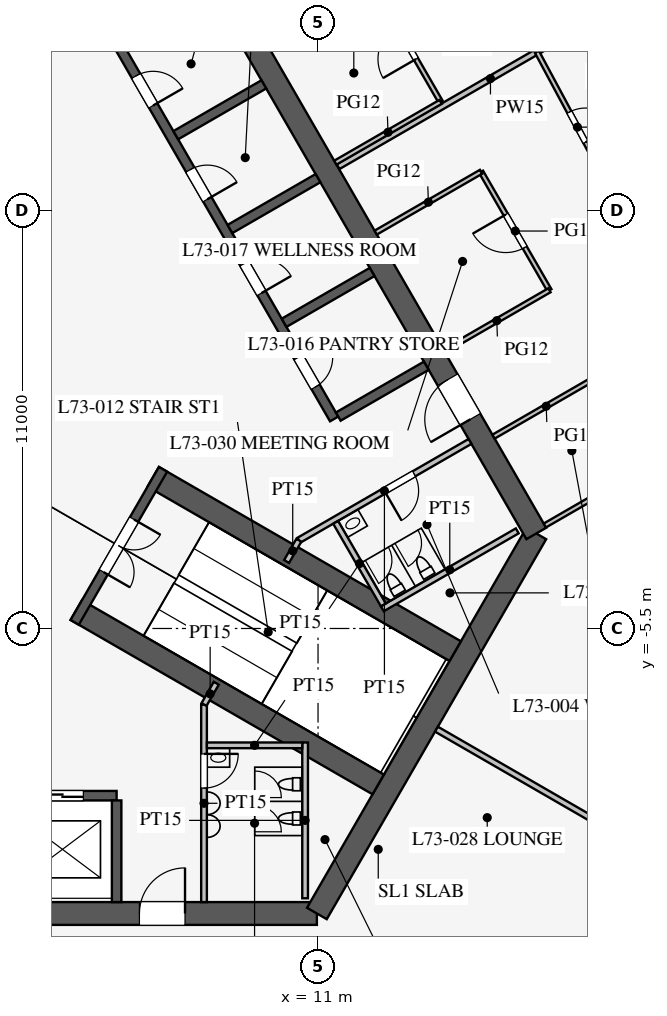
"""IFC4 building model, lengths in metres.
Left out: names, types, materials, properties, quantities, classifications, styles, units other than length and angle.
Written with IfcOpenShell. Run it as: python <this file> out.ifc"""

import sys

from ifc_helpers import new_model, si_unit, direction, frame, frame_2d, origin, place, context, subcontext, project, spatial, rectangle, extrude, element, fill, save


model = new_model("IFC4")
c1 = context("Model", 3, precision=1e-05, world=origin(), true_north=direction((0.0, 1.0)))
c2 = subcontext(c1, "Body", "Model", "MODEL_VIEW")
j1 = project(units=[si_unit("LENGTHUNIT", "METRE"), si_unit("PLANEANGLEUNIT", "RADIAN")], contexts=[c1])
p1 = place(None, origin())
s1 = spatial("IfcSite", under=j1, at=p1, CompositionType="ELEMENT")
p2 = place(p1, origin())
s2 = spatial("IfcBuilding", under=s1, at=p2, CompositionType="ELEMENT")
p3 = place(p2, frame((0.0, 0.0, 318.3)))
s3 = spatial("IfcBuildingStorey", under=s2, at=p3, CompositionType="ELEMENT", Elevation=318.3)
p4 = place(p3, frame((-10.97, -13.0, 0.0), z_axis=(0.0, 0.0, 1.0), x_axis=(1.0, 0.0, 0.0)))
e1 = element("IfcWall", 1, at=p4, inside=s3, PredefinedType="SHEAR", context=c2, shape_type="SweptSolid", body=[
    extrude(rectangle(XDim=21.939, YDim=0.6, at=frame_2d((10.97, 0.0))), origin(), (0.0, 0.0, 1.0), 4.2),
])
p5 = place(p4, frame((17.27, 0.0, 0.0)))
e2 = element("IfcOpeningElement", 2, at=p5, cuts=e1, PredefinedType="OPENING", context=c2, shape_type="SweptSolid", body=[
    extrude(rectangle(XDim=1.2, YDim=2.1, at=frame_2d((0.6, 1.05))), frame((0.0, 0.31, 0.0), z_axis=(0.0, -1.0, 0.0), x_axis=(1.0, 0.0, 0.0)), (0.0, 0.0, 1.0), 0.62),
])
p6 = place(p4, frame((3.47, 0.0, 0.0)))
e3 = element("IfcOpeningElement", 3, at=p6, cuts=e1, PredefinedType="OPENING", context=c2, shape_type="SweptSolid", body=[
    extrude(rectangle(XDim=1.2, YDim=2.1, at=frame_2d((0.6, 1.05))), frame((0.0, 0.31, 0.0), z_axis=(0.0, -1.0, 0.0), x_axis=(1.0, 0.0, 0.0)), (0.0, 0.0, 1.0), 0.62),
])
p7 = place(p3, frame((10.97, -13.0, 0.0), z_axis=(0.0, 0.0, 1.0), x_axis=(0.499995765644, 0.866027848477, 0.0)))
e4 = element("IfcWall", 4, at=p7, inside=s3, PredefinedType="SHEAR", context=c2, shape_type="SweptSolid", body=[
    extrude(rectangle(XDim=11.547, YDim=0.6, at=frame_2d((5.773, 0.0))), origin(), (0.0, 0.0, 1.0), 4.2),
])
p8 = place(p3, frame((16.743, -3.0, 0.0), z_axis=(0.0, 0.0, 1.0), x_axis=(-0.500002442456, 0.866023993627, 0.0)))
e5 = element("IfcWall", 5, at=p8, inside=s3, PredefinedType="SHEAR", context=c2, shape_type="SweptSolid", body=[
    extrude(rectangle(XDim=21.939, YDim=0.6, at=frame_2d((10.97, 0.0))), origin(), (0.0, 0.0, 1.0), 4.2),
])
p9 = place(p8, frame((17.27, 0.0, 0.0)))
e6 = element("IfcOpeningElement", 6, at=p9, cuts=e5, PredefinedType="OPENING", context=c2, shape_type="SweptSolid", body=[
    extrude(rectangle(XDim=1.2, YDim=2.1, at=frame_2d((0.6, 1.05))), frame((0.0, 0.31, 0.0), z_axis=(0.0, -1.0, 0.0), x_axis=(1.0, 0.0, 0.0)), (0.0, 0.0, 1.0), 0.62),
])
p10 = place(p8, frame((3.47, 0.0, 0.0)))
e7 = element("IfcOpeningElement", 7, at=p10, cuts=e5, PredefinedType="OPENING", context=c2, shape_type="SweptSolid", body=[
    extrude(rectangle(XDim=1.2, YDim=2.1, at=frame_2d((0.6, 1.05))), frame((0.0, 0.31, 0.0), z_axis=(0.0, -1.0, 0.0), x_axis=(1.0, 0.0, 0.0)), (0.0, 0.0, 1.0), 0.62),
])
p11 = place(p3, frame((-5.7, -9.9, 0.0), z_axis=(0.0, 0.0, 1.0), x_axis=(1.0, 0.0, 0.0)))
e8 = element("IfcWall", 8, at=p11, inside=s3, PredefinedType="SHEAR", context=c2, shape_type="SweptSolid", body=[
    extrude(rectangle(XDim=11.4, YDim=0.25, at=frame_2d((5.7, 0.0))), origin(), (0.0, 0.0, 1.0), 4.2),
])
p12 = place(p11, frame((0.875, 0.0, 0.0)))
e9 = element("IfcOpeningElement", 9, at=p12, cuts=e8, PredefinedType="OPENING", context=c2, shape_type="SweptSolid", body=[
    extrude(rectangle(XDim=1.1, YDim=2.2, at=frame_2d((0.55, 1.1))), frame((0.0, 0.135, 0.0), z_axis=(0.0, -1.0, 0.0), x_axis=(1.0, 0.0, 0.0)), (0.0, 0.0, 1.0), 0.27),
])
p13 = place(p11, frame((3.725, 0.0, 0.0)))
e10 = element("IfcOpeningElement", 10, at=p13, cuts=e8, PredefinedType="OPENING", context=c2, shape_type="SweptSolid", body=[
    extrude(rectangle(XDim=1.1, YDim=2.2, at=frame_2d((0.55, 1.1))), frame((0.0, 0.135, 0.0), z_axis=(0.0, -1.0, 0.0), x_axis=(1.0, 0.0, 0.0)), (0.0, 0.0, 1.0), 0.27),
])
p14 = place(p11, frame((6.575, 0.0, 0.0)))
e11 = element("IfcOpeningElement", 11, at=p14, cuts=e8, PredefinedType="OPENING", context=c2, shape_type="SweptSolid", body=[
    extrude(rectangle(XDim=1.1, YDim=2.2, at=frame_2d((0.55, 1.1))), frame((0.0, 0.135, 0.0), z_axis=(0.0, -1.0, 0.0), x_axis=(1.0, 0.0, 0.0)), (0.0, 0.0, 1.0), 0.27),
])
p15 = place(p11, frame((9.425, 0.0, 0.0)))
e12 = element("IfcOpeningElement", 12, at=p15, cuts=e8, PredefinedType="OPENING", context=c2, shape_type="SweptSolid", body=[
    extrude(rectangle(XDim=1.1, YDim=2.2, at=frame_2d((0.55, 1.1))), frame((0.0, 0.135, 0.0), z_axis=(0.0, -1.0, 0.0), x_axis=(1.0, 0.0, 0.0)), (0.0, 0.0, 1.0), 0.27),
])
p16 = place(p3, frame((5.7, -10.025, 0.0), z_axis=(0.0, 0.0, 1.0), x_axis=(0.0, -1.0, 0.0)))
e13 = element("IfcWall", 13, at=p16, inside=s3, PredefinedType="SHEAR", context=c2, shape_type="SweptSolid", body=[
    extrude(rectangle(XDim=2.675, YDim=0.25, at=frame_2d((1.337, 0.0))), origin(), (0.0, 0.0, 1.0), 4.2),
])
p17 = place(p3, frame((11.424, 0.014, 0.0), z_axis=(0.0, 0.0, 1.0), x_axis=(-0.500001763848, 0.866024385424, 0.0)))
e14 = element("IfcWall", 14, at=p17, inside=s3, PredefinedType="SHEAR", context=c2, shape_type="SweptSolid", body=[
    extrude(rectangle(XDim=11.4, YDim=0.25, at=frame_2d((5.7, 0.0))), origin(), (0.0, 0.0, 1.0), 4.2),
])
p18 = place(p17, frame((0.975, 0.0, 0.0)))
e15 = element("IfcOpeningElement", 15, at=p18, cuts=e14, PredefinedType="OPENING", context=c2, shape_type="SweptSolid", body=[
    extrude(rectangle(XDim=0.9, YDim=2.1, at=frame_2d((0.45, 1.05))), frame((0.0, 0.135, 0.0), z_axis=(0.0, -1.0, 0.0), x_axis=(1.0, 0.0, 0.0)), (0.0, 0.0, 1.0), 0.27),
])
p19 = place(p17, frame((3.825, 0.0, 0.0)))
e16 = element("IfcOpeningElement", 16, at=p19, cuts=e14, PredefinedType="OPENING", context=c2, shape_type="SweptSolid", body=[
    extrude(rectangle(XDim=0.9, YDim=2.1, at=frame_2d((0.45, 1.05))), frame((0.0, 0.135, 0.0), z_axis=(0.0, -1.0, 0.0), x_axis=(1.0, 0.0, 0.0)), (0.0, 0.0, 1.0), 0.27),
])
p20 = place(p17, frame((6.675, 0.0, 0.0)))
e17 = element("IfcOpeningElement", 17, at=p20, cuts=e14, PredefinedType="OPENING", context=c2, shape_type="SweptSolid", body=[
    extrude(rectangle(XDim=0.9, YDim=2.1, at=frame_2d((0.45, 1.05))), frame((0.0, 0.135, 0.0), z_axis=(0.0, -1.0, 0.0), x_axis=(1.0, 0.0, 0.0)), (0.0, 0.0, 1.0), 0.27),
])
p21 = place(p17, frame((9.525, 0.0, 0.0)))
e18 = element("IfcOpeningElement", 18, at=p21, cuts=e14, PredefinedType="OPENING", context=c2, shape_type="SweptSolid", body=[
    extrude(rectangle(XDim=0.9, YDim=2.1, at=frame_2d((0.45, 1.05))), frame((0.0, 0.135, 0.0), z_axis=(0.0, -1.0, 0.0), x_axis=(1.0, 0.0, 0.0)), (0.0, 0.0, 1.0), 0.27),
])
for number, where, z_axis, x_axis in (
    (19, (11.532, 0.076, 0.0), (0.0, 0.0, 1.0), (0.866, 0.5, 0.0)),
    (20, (10.107, 2.544, 0.0), (0.0, 0.0, 1.0), (0.866, 0.5, 0.0)),
    (21, (8.682, 5.012, 0.0), (0.0, 0.0, 1.0), (0.866, 0.5, 0.0)),
    (22, (7.257, 7.481, 0.0), (0.0, 0.0, 1.0), (0.866, 0.5, 0.0)),
):
    element("IfcWall", number, at=place(p3, frame(where, z_axis=z_axis, x_axis=x_axis)), inside=s3, PredefinedType="SHEAR", context=c2, shape_type="SweptSolid", body=[
        extrude(rectangle(XDim=2.675, YDim=0.25, at=frame_2d((1.337, 0.0))), origin(), (0.0, 0.0, 1.0), 4.2),
    ])
p22 = place(p3, frame((4.638, -5.016, 0.0), z_axis=(0.0, 0.0, 1.0), x_axis=(0.866012320003, -0.50002266109, 0.0)))
e23 = element("IfcWall", 23, at=p22, inside=s3, PredefinedType="SHEAR", context=c2, shape_type="SweptSolid", body=[
    extrude(rectangle(XDim=9.175, YDim=0.6, at=frame_2d((4.587, 0.0))), origin(), (0.0, 0.0, 1.0), 4.2),
])
p23 = place(p3, frame((6.663, -1.509, 0.0), z_axis=(0.0, 0.0, 1.0), x_axis=(0.86603049496, -0.499991181721, 0.0)))
e24 = element("IfcWall", 24, at=p23, inside=s3, PredefinedType="SHEAR", context=c2, shape_type="SweptSolid", body=[
    extrude(rectangle(XDim=9.175, YDim=0.6, at=frame_2d((4.587, 0.0))), origin(), (0.0, 0.0, 1.0), 4.2),
])
p24 = place(p3, frame((4.597, -5.339, 0.0), z_axis=(0.0, 0.0, 1.0), x_axis=(0.499984536904, 0.866034331223, 0.0)))
e25 = element("IfcWall", 25, at=p24, inside=s3, PredefinedType="SHEAR", context=c2, shape_type="SweptSolid", body=[
    extrude(rectangle(XDim=4.65, YDim=0.25, at=frame_2d((2.325, 0.0))), origin(), (0.0, 0.0, 1.0), 4.2),
])
p25 = place(p24, frame((1.525, 0.0, 0.0)))
e26 = element("IfcOpeningElement", 26, at=p25, cuts=e25, PredefinedType="OPENING", context=c2, shape_type="SweptSolid", body=[
    extrude(rectangle(XDim=1.6, YDim=2.1, at=frame_2d((0.8, 1.05))), frame((0.0, 0.135, 0.0), z_axis=(0.0, -1.0, 0.0), x_axis=(1.0, 0.0, 0.0)), (0.0, 0.0, 1.0), 0.27),
])
p26 = place(p3, frame((8.0, -7.5, 0.0), z_axis=(0.0, 0.0, 1.0), x_axis=(0.0, -1.0, 0.0)))
e27 = element("IfcWall", 27, at=p26, inside=s3, PredefinedType="PARTITIONING", context=c2, shape_type="SweptSolid", body=[
    extrude(rectangle(XDim=5.2, YDim=0.15, at=frame_2d((2.6, 0.0))), origin(), (0.0, 0.0, 1.0), 4.0),
])
p27 = place(p26, frame((1.3, 0.0, 0.0)))
e28 = element("IfcOpeningElement", 28, at=p27, cuts=e27, PredefinedType="OPENING", context=c2, shape_type="SweptSolid", body=[
    extrude(rectangle(XDim=0.9, YDim=2.1, at=frame_2d((0.45, 1.05))), frame((0.0, 0.085, 0.0), z_axis=(0.0, -1.0, 0.0), x_axis=(1.0, 0.0, 0.0)), (0.0, 0.0, 1.0), 0.17),
])
p28 = place(p3, frame((10.495, -3.178, 0.0), z_axis=(0.0, 0.0, 1.0), x_axis=(0.866021400173, 0.500006934395, 0.0)))
e29 = element("IfcWall", 29, at=p28, inside=s3, PredefinedType="PARTITIONING", context=c2, shape_type="SweptSolid", body=[
    extrude(rectangle(XDim=5.2, YDim=0.15, at=frame_2d((2.6, 0.0))), origin(), (0.0, 0.0, 1.0), 4.0),
])
p29 = place(p28, frame((2.6, 0.0, 0.0)))
e30 = element("IfcOpeningElement", 30, at=p29, cuts=e29, PredefinedType="OPENING", context=c2, shape_type="SweptSolid", body=[
    extrude(rectangle(XDim=0.9, YDim=2.1, at=frame_2d((0.45, 1.05))), frame((0.0, 0.085, 0.0), z_axis=(0.0, -1.0, 0.0), x_axis=(1.0, 0.0, 0.0)), (0.0, 0.0, 1.0), 0.17),
])
for number, where, z_axis, x_axis in (
    (31, (8.0, -7.5, 0.0), (0.0, 0.0, 1.0), (0.5, 0.866, 0.0)),
    (32, (10.495, -3.178, 0.0), (0.0, 0.0, 1.0), (-0.5, -0.866, 0.0)),
):
    element("IfcWall", number, at=place(p3, frame(where, z_axis=z_axis, x_axis=x_axis)), inside=s3, PredefinedType="PARTITIONING", context=c2, shape_type="SweptSolid", body=[
        extrude(rectangle(XDim=0.645, YDim=0.15, at=frame_2d((0.323, 0.0))), origin(), (0.0, 0.0, 1.0), 4.0),
    ])
p30 = place(p3, frame((10.66, -8.5, 0.0), z_axis=(0.0, 0.0, 1.0), x_axis=(0.0, -1.0, 0.0)))
e33 = element("IfcWall", 33, at=p30, inside=s3, PredefinedType="PARTITIONING", context=c2, shape_type="SweptSolid", body=[
    extrude(rectangle(XDim=4.1, YDim=0.15, at=frame_2d((2.05, 0.0))), origin(), (0.0, 0.0, 1.0), 4.0),
])
p31 = place(p3, frame((8.075, -8.575, 0.0), z_axis=(0.0, 0.0, 1.0), x_axis=(1.0, 0.0, 0.0)))
e34 = element("IfcWall", 34, at=p31, inside=s3, PredefinedType="PARTITIONING", context=c2, shape_type="SweptSolid", body=[
    extrude(rectangle(XDim=2.51, YDim=0.15, at=frame_2d((1.255, 0.0))), origin(), (0.0, 0.0, 1.0), 4.0),
])
p32 = place(p3, frame((12.691, -4.982, 0.0), z_axis=(0.0, 0.0, 1.0), x_axis=(0.8660249478, 0.500000789788, 0.0)))
e35 = element("IfcWall", 35, at=p32, inside=s3, PredefinedType="PARTITIONING", context=c2, shape_type="SweptSolid", body=[
    extrude(rectangle(XDim=4.1, YDim=0.15, at=frame_2d((2.05, 0.0))), origin(), (0.0, 0.0, 1.0), 4.0),
])
p33 = place(p3, frame((11.464, -2.706, 0.0), z_axis=(0.0, 0.0, 1.0), x_axis=(0.50001992892, -0.866013897511, 0.0)))
e36 = element("IfcWall", 36, at=p33, inside=s3, PredefinedType="PARTITIONING", context=c2, shape_type="SweptSolid", body=[
    extrude(rectangle(XDim=2.51, YDim=0.15, at=frame_2d((1.255, 0.0))), origin(), (0.0, 0.0, 1.0), 4.0),
])
p34 = place(p3, frame((14.116, -8.15, 0.0), z_axis=(0.0, 0.0, 1.0), x_axis=(0.866020541135, -0.500008422262, 0.0)))
e37 = element("IfcWall", 37, at=p34, inside=s3, PredefinedType="PARTITIONING", context=c2, shape_type="SweptSolid", body=[
    extrude(rectangle(XDim=13.45, YDim=0.15, at=frame_2d((6.725, 0.0))), origin(), (0.0, 0.0, 1.0), 2.0),
])
p35 = place(p3, frame((11.527, 6.655, 0.0), z_axis=(0.0, 0.0, 1.0), x_axis=(0.866021846952, 0.500006160563, 0.0)))
e38 = element("IfcWall", 38, at=p35, inside=s3, PredefinedType="PARTITIONING", context=c2, shape_type="SweptSolid", body=[
    extrude(rectangle(XDim=9.262, YDim=0.15, at=frame_2d((4.631, 0.0))), origin(), (0.0, 0.0, 1.0), 3.3),
])
p36 = place(p3, frame((14.227, 8.358, 0.0), z_axis=(0.0, 0.0, 1.0), x_axis=(-0.499961193289, 0.866047807691, 0.0)))
e39 = element("IfcWall", 39, at=p36, inside=s3, PredefinedType="PARTITIONING", context=c2, shape_type="SweptSolid", body=[
    extrude(rectangle(XDim=3.6, YDim=0.12, at=frame_2d((1.8, 0.0))), origin(), (0.0, 0.0, 1.0), 2.9),
])
p37 = place(p36, frame((1.3, 0.0, 0.15)))
e40 = element("IfcOpeningElement", 40, at=p37, cuts=e39, PredefinedType="OPENING", context=c2, shape_type="SweptSolid", body=[
    extrude(rectangle(XDim=1.0, YDim=2.1, at=frame_2d((0.5, 1.05))), frame((0.0, 0.07, 0.0), z_axis=(0.0, -1.0, 0.0), x_axis=(1.0, 0.0, 0.0)), (0.0, 0.0, 1.0), 0.14),
])
p38 = place(p3, frame((17.089, 3.4, 0.0), z_axis=(0.0, 0.0, 1.0), x_axis=(-0.499982693035, 0.866035395735, 0.0)))
e41 = element("IfcWall", 41, at=p38, inside=s3, PredefinedType="PARTITIONING", context=c2, shape_type="SweptSolid", body=[
    extrude(rectangle(XDim=3.6, YDim=0.12, at=frame_2d((1.8, 0.0))), origin(), (0.0, 0.0, 1.0), 2.9),
])
p39 = place(p38, frame((1.3, 0.0, 0.15)))
e42 = element("IfcOpeningElement", 42, at=p39, cuts=e41, PredefinedType="OPENING", context=c2, shape_type="SweptSolid", body=[
    extrude(rectangle(XDim=1.0, YDim=2.1, at=frame_2d((0.5, 1.05))), frame((0.0, 0.07, 0.0), z_axis=(0.0, -1.0, 0.0), x_axis=(1.0, 0.0, 0.0)), (0.0, 0.0, 1.0), 0.14),
])
p40 = place(p3, frame((11.456, 6.758, 0.0), z_axis=(0.0, 0.0, 1.0), x_axis=(0.866042017984, 0.499971222258, 0.0)))
e43 = element("IfcWall", 43, at=p40, inside=s3, PredefinedType="PARTITIONING", context=c2, shape_type="SweptSolid", body=[
    extrude(rectangle(XDim=3.2, YDim=0.12, at=frame_2d((1.6, 0.0))), origin(), (0.0, 0.0, 1.0), 2.9),
])
p41 = place(p3, frame((16.968, -2.79, 0.0), z_axis=(0.0, 0.0, 1.0), x_axis=(0.866028054938, 0.499995408039, 0.0)))
e44 = element("IfcWall", 44, at=p41, inside=s3, PredefinedType="PARTITIONING", context=c2, shape_type="SweptSolid", body=[
    extrude(rectangle(XDim=3.2, YDim=0.12, at=frame_2d((1.6, 0.0))), origin(), (0.0, 0.0, 1.0), 2.9),
])
for number, where, z_axis, x_axis in (
    (45, (12.518, 4.918, 0.0), (0.0, 0.0, 1.0), (0.866, 0.5, 0.0)),
    (46, (14.318, 1.8, 0.0), (0.0, 0.0, 1.0), (0.866, 0.5, 0.0)),
    (47, (15.618, -0.451, 0.0), (0.0, 0.0, 1.0), (0.866, 0.5, 0.0)),
):
    element("IfcWall", number, at=place(p3, frame(where, z_axis=z_axis, x_axis=x_axis)), inside=s3, PredefinedType="PARTITIONING", context=c2, shape_type="SweptSolid", body=[
        extrude(rectangle(XDim=3.2, YDim=0.12, at=frame_2d((1.6, 0.0))), origin(), (0.0, 0.0, 1.0), 2.9),
    ])
p42 = place(p3, frame((18.891, 5.71, 0.0), z_axis=(0.0, 0.0, 1.0), x_axis=(-0.473524102582, 0.880780860529, 0.0)))
e48 = element("IfcWall", 48, at=p42, inside=s3, PredefinedType="PARTITIONING", context=c2, shape_type="SweptSolid", body=[
    extrude(rectangle(XDim=4.502, YDim=0.12, at=frame_2d((2.251, 0.0))), origin(), (0.0, 0.0, 1.0), 2.9),
])
p43 = place(p42, frame((1.8, 0.0, 0.15)))
e49 = element("IfcOpeningElement", 49, at=p43, cuts=e48, PredefinedType="OPENING", context=c2, shape_type="SweptSolid", body=[
    extrude(rectangle(XDim=0.9, YDim=2.1, at=frame_2d((0.45, 1.05))), frame((0.0, 0.07, 0.0), z_axis=(0.0, -1.0, 0.0), x_axis=(1.0, 0.0, 0.0)), (0.0, 0.0, 1.0), 0.14),
])
p44 = place(p27, origin())
e50 = element("IfcDoor", 50, at=p44, inside=s3, OperationType="SINGLE_SWING_LEFT", PredefinedType="DOOR", context=c2, shape_type="SweptSolid", body=[
    extrude(rectangle(XDim=0.9, YDim=2.1, at=frame_2d((0.45, 1.05))), frame((0.0, 0.025, 0.0), z_axis=(0.0, -1.0, 0.0), x_axis=(1.0, 0.0, 0.0)), (0.0, 0.0, 1.0), 0.05),
])
fill(e28, e50)
p45 = place(p29, frame((0.9, 0.0, 0.0), z_axis=(0.0, 0.0, 1.0), x_axis=(-1.0, 0.0, 0.0)))
e51 = element("IfcDoor", 51, at=p45, inside=s3, OperationType="SINGLE_SWING_RIGHT", PredefinedType="DOOR", context=c2, shape_type="SweptSolid", body=[
    extrude(rectangle(XDim=0.9, YDim=2.1, at=frame_2d((0.45, 1.05))), frame((0.0, 0.025, 0.0), z_axis=(0.0, -1.0, 0.0), x_axis=(1.0, 0.0, 0.0)), (0.0, 0.0, 1.0), 0.05),
])
fill(e30, e51)
p46 = place(p25, frame((1.6, 0.0, 0.0), z_axis=(0.0, 0.0, 1.0), x_axis=(-1.0, 0.0, 0.0)))
e52 = element("IfcDoor", 52, at=p46, inside=s3, OperationType="DOUBLE_DOOR_SINGLE_SWING", PredefinedType="DOOR", context=c2, shape_type="SweptSolid", body=[
    extrude(rectangle(XDim=1.6, YDim=2.1, at=frame_2d((0.8, 1.05))), frame((0.0, 0.025, 0.0), z_axis=(0.0, -1.0, 0.0), x_axis=(1.0, 0.0, 0.0)), (0.0, 0.0, 1.0), 0.05),
])
fill(e26, e52)
p47 = place(p5, origin())
e53 = element("IfcDoor", 53, at=p47, inside=s3, OperationType="SINGLE_SWING_RIGHT", PredefinedType="DOOR", context=c2, shape_type="SweptSolid", body=[
    extrude(rectangle(XDim=1.2, YDim=2.1, at=frame_2d((0.6, 1.05))), frame((0.0, 0.025, 0.0), z_axis=(0.0, -1.0, 0.0), x_axis=(1.0, 0.0, 0.0)), (0.0, 0.0, 1.0), 0.05),
])
fill(e2, e53)
p48 = place(p10, origin())
e54 = element("IfcDoor", 54, at=p48, inside=s3, OperationType="SINGLE_SWING_LEFT", PredefinedType="DOOR", context=c2, shape_type="SweptSolid", body=[
    extrude(rectangle(XDim=1.2, YDim=2.1, at=frame_2d((0.6, 1.05))), frame((0.0, 0.025, 0.0), z_axis=(0.0, -1.0, 0.0), x_axis=(1.0, 0.0, 0.0)), (0.0, 0.0, 1.0), 0.05),
])
fill(e7, e54)
p49 = place(p18, frame((0.9, 0.0, 0.0), z_axis=(0.0, 0.0, 1.0), x_axis=(-1.0, 0.0, 0.0)))
e55 = element("IfcDoor", 55, at=p49, inside=s3, OperationType="SINGLE_SWING_LEFT", PredefinedType="DOOR", context=c2, shape_type="SweptSolid", body=[
    extrude(rectangle(XDim=0.9, YDim=2.1, at=frame_2d((0.45, 1.05))), frame((0.0, 0.025, 0.0), z_axis=(0.0, -1.0, 0.0), x_axis=(1.0, 0.0, 0.0)), (0.0, 0.0, 1.0), 0.05),
])
fill(e15, e55)
p50 = place(p19, frame((0.9, 0.0, 0.0), z_axis=(0.0, 0.0, 1.0), x_axis=(-1.0, 0.0, 0.0)))
e56 = element("IfcDoor", 56, at=p50, inside=s3, OperationType="SINGLE_SWING_RIGHT", PredefinedType="DOOR", context=c2, shape_type="SweptSolid", body=[
    extrude(rectangle(XDim=0.9, YDim=2.1, at=frame_2d((0.45, 1.05))), frame((0.0, 0.025, 0.0), z_axis=(0.0, -1.0, 0.0), x_axis=(1.0, 0.0, 0.0)), (0.0, 0.0, 1.0), 0.05),
])
fill(e16, e56)
p51 = place(p20, frame((0.9, 0.0, 0.0), z_axis=(0.0, 0.0, 1.0), x_axis=(-1.0, 0.0, 0.0)))
e57 = element("IfcDoor", 57, at=p51, inside=s3, OperationType="SINGLE_SWING_RIGHT", PredefinedType="DOOR", context=c2, shape_type="SweptSolid", body=[
    extrude(rectangle(XDim=0.9, YDim=2.1, at=frame_2d((0.45, 1.05))), frame((0.0, 0.025, 0.0), z_axis=(0.0, -1.0, 0.0), x_axis=(1.0, 0.0, 0.0)), (0.0, 0.0, 1.0), 0.05),
])
fill(e17, e57)
p52 = place(p21, frame((0.9, 0.0, 0.0), z_axis=(0.0, 0.0, 1.0), x_axis=(-1.0, 0.0, 0.0)))
e58 = element("IfcDoor", 58, at=p52, inside=s3, OperationType="SINGLE_SWING_RIGHT", PredefinedType="DOOR", context=c2, shape_type="SweptSolid", body=[
    extrude(rectangle(XDim=0.9, YDim=2.1, at=frame_2d((0.45, 1.05))), frame((0.0, 0.025, 0.0), z_axis=(0.0, -1.0, 0.0), x_axis=(1.0, 0.0, 0.0)), (0.0, 0.0, 1.0), 0.05),
])
fill(e18, e58)
p53 = place(p39, origin())
e59 = element("IfcDoor", 59, at=p53, inside=s3, OperationType="SINGLE_SWING_RIGHT", PredefinedType="DOOR", context=c2, shape_type="SweptSolid", body=[
    extrude(rectangle(XDim=1.0, YDim=2.1, at=frame_2d((0.5, 1.05))), frame((0.0, 0.025, 0.0), z_axis=(0.0, -1.0, 0.0), x_axis=(1.0, 0.0, 0.0)), (0.0, 0.0, 1.0), 0.05),
])
fill(e42, e59)
p54 = place(p37, origin())
e60 = element("IfcDoor", 60, at=p54, inside=s3, OperationType="SINGLE_SWING_LEFT", PredefinedType="DOOR", context=c2, shape_type="SweptSolid", body=[
    extrude(rectangle(XDim=1.0, YDim=2.1, at=frame_2d((0.5, 1.05))), frame((0.0, 0.025, 0.0), z_axis=(0.0, -1.0, 0.0), x_axis=(1.0, 0.0, 0.0)), (0.0, 0.0, 1.0), 0.05),
])
fill(e40, e60)
p55 = place(p43, frame((0.9, 0.0, 0.0), z_axis=(0.0, 0.0, 1.0), x_axis=(-1.0, 0.0, 0.0)))
e61 = element("IfcDoor", 61, at=p55, inside=s3, OperationType="SINGLE_SWING_RIGHT", PredefinedType="DOOR", context=c2, shape_type="SweptSolid", body=[
    extrude(rectangle(XDim=0.9, YDim=2.1, at=frame_2d((0.45, 1.05))), frame((0.0, 0.025, 0.0), z_axis=(0.0, -1.0, 0.0), x_axis=(1.0, 0.0, 0.0)), (0.0, 0.0, 1.0), 0.05),
])
fill(e49, e61)
p56 = place(p15, origin())
e62 = element("IfcDoor", 62, at=p56, inside=s3, OperationType="DOUBLE_DOOR_SLIDING", PredefinedType="DOOR", context=c2, shape_type="SweptSolid", body=[
    extrude(rectangle(XDim=1.1, YDim=2.2, at=frame_2d((0.55, 1.1))), frame((0.0, 0.025, 0.0), z_axis=(0.0, -1.0, 0.0), x_axis=(1.0, 0.0, 0.0)), (0.0, 0.0, 1.0), 0.05),
])
fill(e12, e62)
save(model, sys.argv[1])
